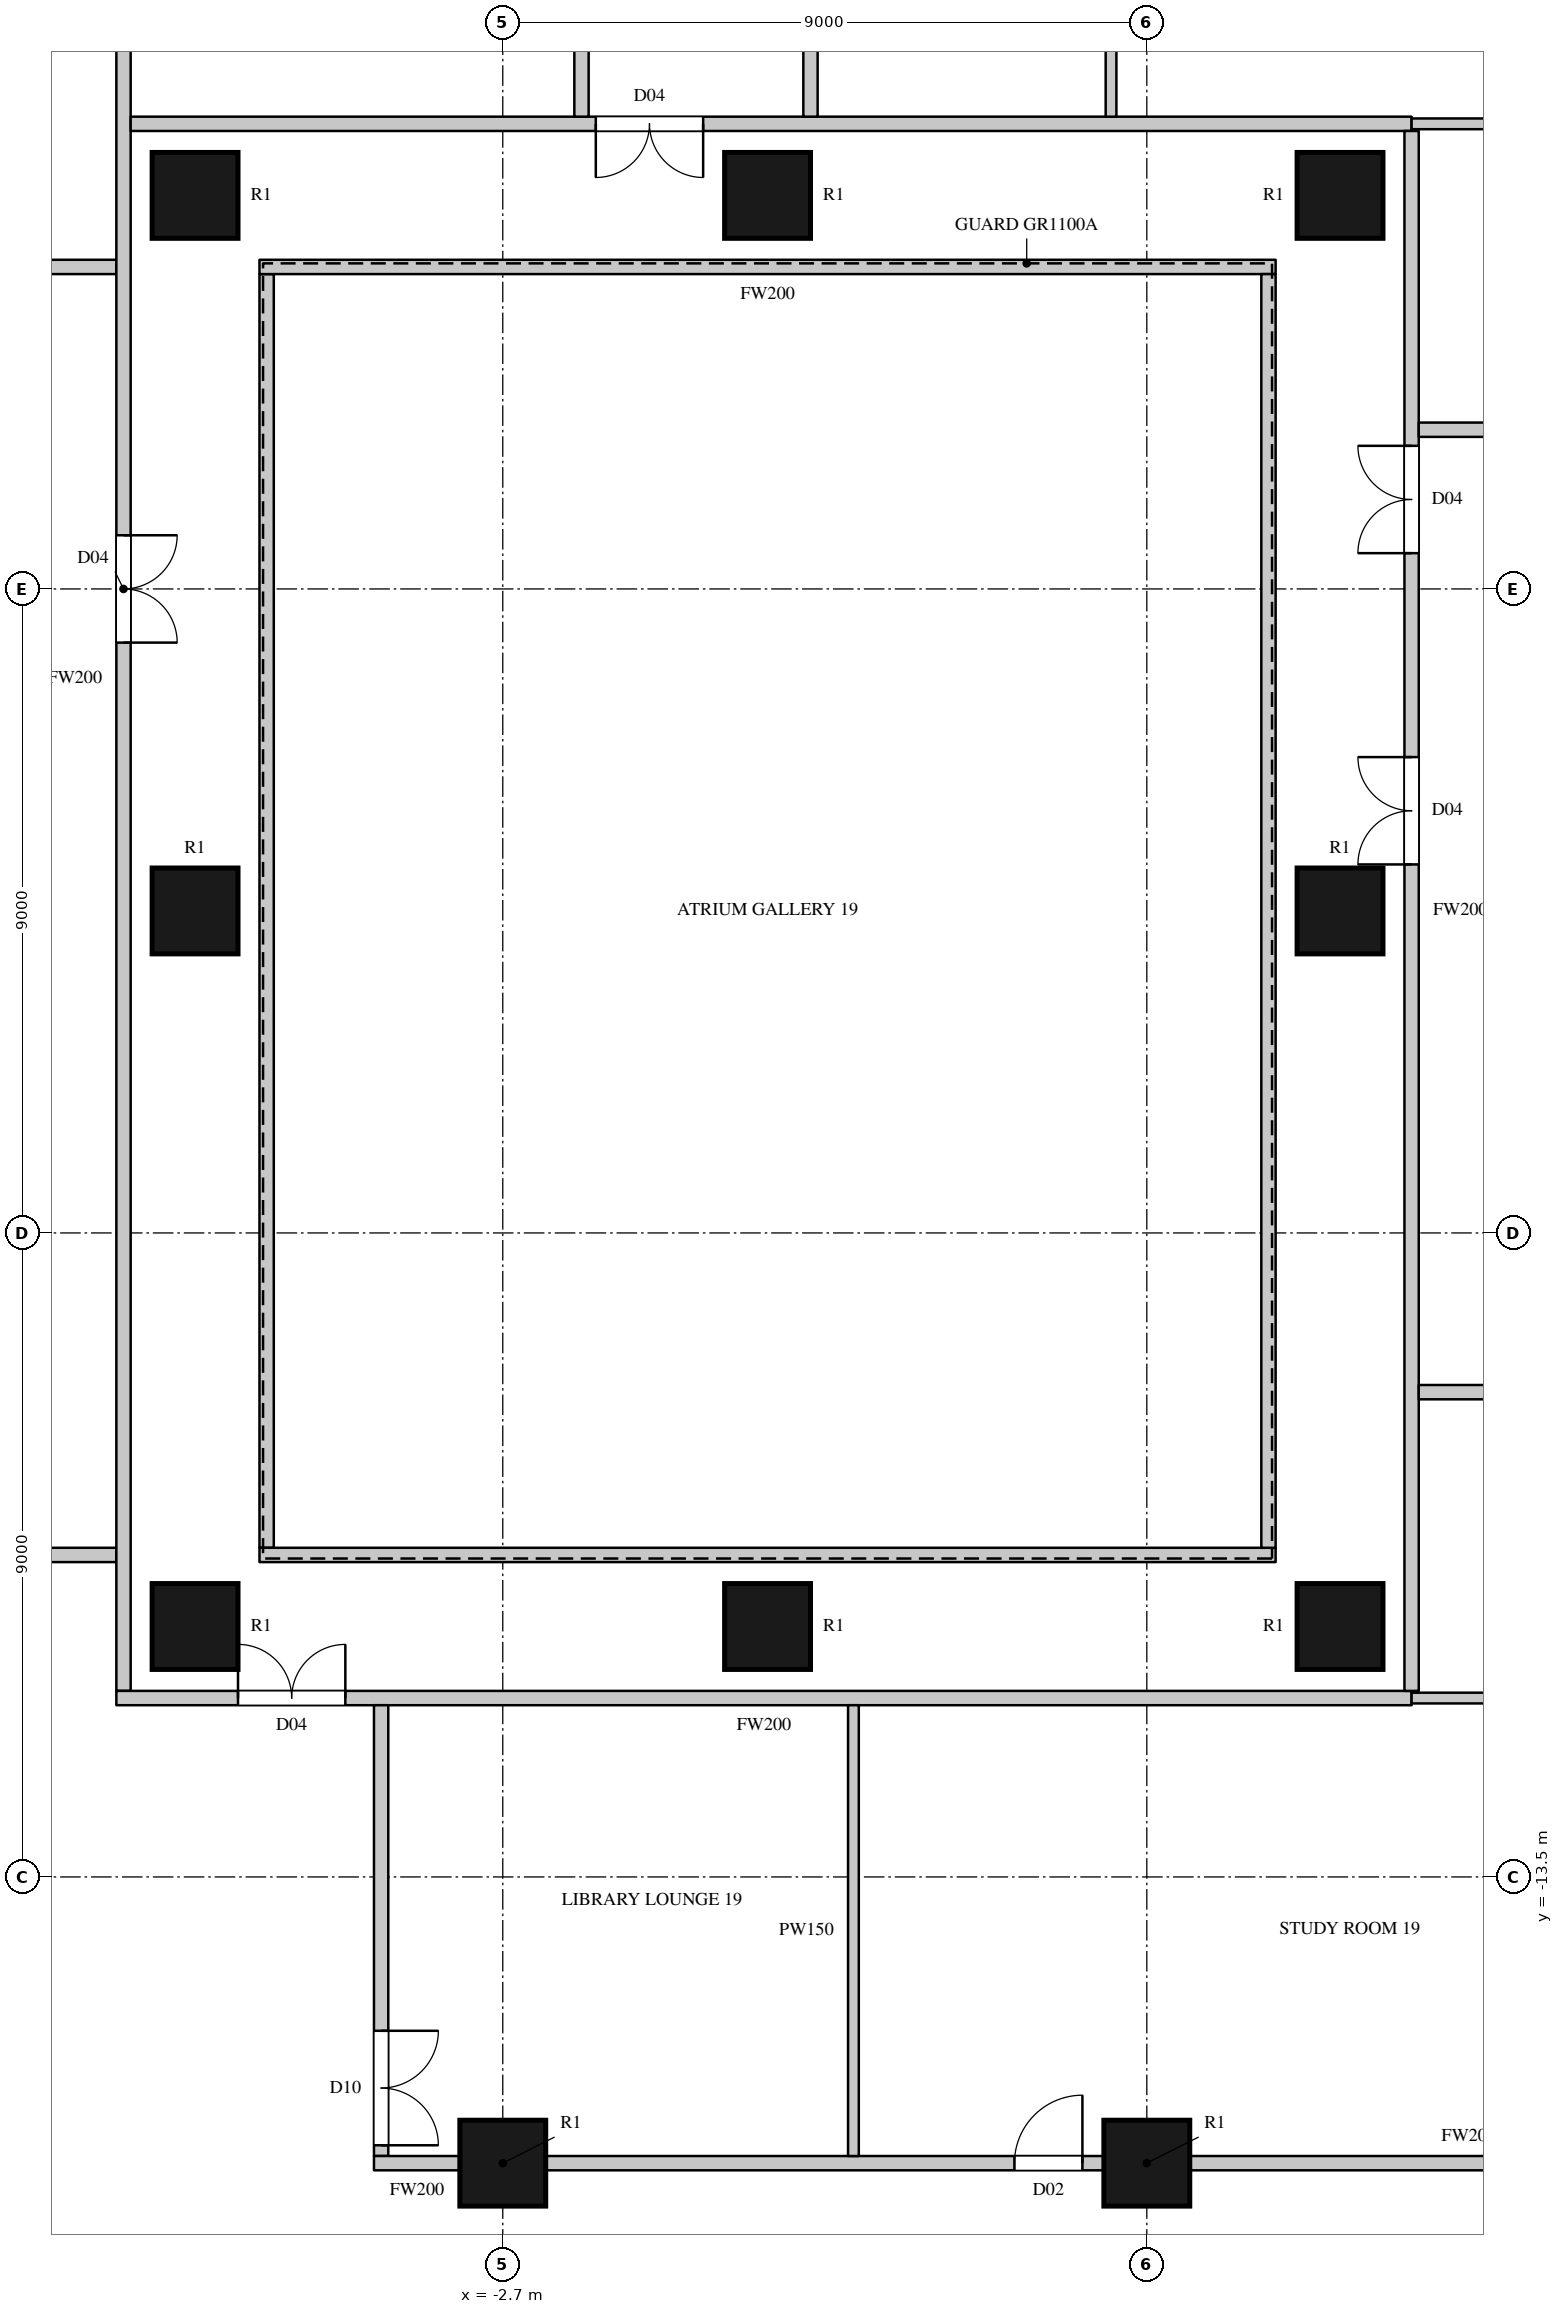
"""IFC4 building model, lengths in metres.
Left out: names, types, materials, properties, quantities, classifications, styles, units other than length and angle.
Written with IfcOpenShell. Run it as: python <this file> out.ifc"""

import sys

from ifc_helpers import new_model, si_unit, direction, frame, frame_2d, origin, origin_2d, place, context, subcontext, project, spatial, rectangle, circle, extrude, element, fill, save


model = new_model("IFC4")
c1 = context("Model", 3, precision=1e-05, world=origin(), true_north=direction((0.0, 1.0)))
c2 = subcontext(c1, "Body", "Model", "MODEL_VIEW")
j1 = project(units=[si_unit("LENGTHUNIT", "METRE"), si_unit("PLANEANGLEUNIT", "RADIAN")], contexts=[c1])
p1 = place(None, origin())
s1 = spatial("IfcSite", under=j1, at=p1, CompositionType="ELEMENT")
p2 = place(p1, origin())
s2 = spatial("IfcBuilding", under=s1, at=p2, CompositionType="ELEMENT")
p3 = place(p2, frame((0.0, 0.0, 98.7)))
s3 = spatial("IfcBuildingStorey", under=s2, at=p3, CompositionType="ELEMENT", Elevation=98.7)
for number, where, z_axis, x_axis in (
    (1, (-2.7, -17.5, 0.0), (0.0, 0.0, 1.0), (1.0, 0.0, 0.0)),
    (2, (6.3, -17.5, 0.0), (0.0, 0.0, 1.0), (1.0, 0.0, 0.0)),
    (3, (-7.0, -10.0, 0.0), (0.0, 0.0, 1.0), (1.0, 0.0, 0.0)),
    (4, (-7.0, 0.0, 0.0), (0.0, 0.0, 1.0), (1.0, 0.0, 0.0)),
    (5, (-7.0, 10.0, 0.0), (0.0, 0.0, 1.0), (1.0, 0.0, 0.0)),
    (6, (1.0, -10.0, 0.0), (0.0, 0.0, 1.0), (1.0, 0.0, 0.0)),
    (7, (1.0, 10.0, 0.0), (0.0, 0.0, 1.0), (1.0, 0.0, 0.0)),
    (8, (9.0, -10.0, 0.0), (0.0, 0.0, 1.0), (1.0, 0.0, 0.0)),
    (9, (9.0, 0.0, 0.0), (0.0, 0.0, 1.0), (1.0, 0.0, 0.0)),
    (10, (9.0, 10.0, 0.0), (0.0, 0.0, 1.0), (1.0, 0.0, 0.0)),
):
    element("IfcColumn", number, at=place(p3, frame(where, z_axis=z_axis, x_axis=x_axis)), inside=s3, PredefinedType="COLUMN", context=c2, shape_type="SweptSolid", body=[
        extrude(circle(Radius=0.6, at=origin_2d()), origin(), (0.0, 0.0, 1.0), 3.6),
    ])
p4 = place(p3, frame((-13.97, -9.0, 0.0), z_axis=(0.0, 0.0, 1.0), x_axis=(1.0, 0.0, 0.0)))
e11 = element("IfcWall", 11, at=p4, inside=s3, PredefinedType="PARTITIONING", context=c2, shape_type="SweptSolid", body=[
    extrude(rectangle(XDim=5.87, YDim=0.2, at=frame_2d((2.935, 0.0))), origin(), (0.0, 0.0, 1.0), 3.3),
])
p5 = place(p4, frame((0.4, 0.0, 0.0)))
e12 = element("IfcOpeningElement", 12, at=p5, cuts=e11, PredefinedType="OPENING", context=c2, shape_type="SweptSolid", body=[
    extrude(rectangle(XDim=1.5, YDim=2.2, at=frame_2d((0.75, 1.1))), frame((0.0, 0.11, 0.0), z_axis=(0.0, -1.0, 0.0), x_axis=(1.0, 0.0, 0.0)), (0.0, 0.0, 1.0), 0.22),
])
p6 = place(p4, frame((2.05, 0.0, 0.0)))
e13 = element("IfcOpeningElement", 13, at=p6, cuts=e11, PredefinedType="OPENING", context=c2, shape_type="SweptSolid", body=[
    extrude(rectangle(XDim=1.5, YDim=2.2, at=frame_2d((0.75, 1.1))), frame((0.0, 0.11, 0.0), z_axis=(0.0, -1.0, 0.0), x_axis=(1.0, 0.0, 0.0)), (0.0, 0.0, 1.0), 0.22),
])
p7 = place(p3, frame((-13.97, 9.0, 0.0), z_axis=(0.0, 0.0, 1.0), x_axis=(1.0, 0.0, 0.0)))
e14 = element("IfcWall", 14, at=p7, inside=s3, PredefinedType="PARTITIONING", context=c2, shape_type="SweptSolid", body=[
    extrude(rectangle(XDim=5.87, YDim=0.2, at=frame_2d((2.935, 0.0))), origin(), (0.0, 0.0, 1.0), 3.3),
])
p8 = place(p3, frame((-8.0, -10.9, 0.0), z_axis=(0.0, 0.0, 1.0), x_axis=(0.0, 1.0, 0.0)))
e15 = element("IfcWall", 15, at=p8, inside=s3, PredefinedType="PARTITIONING", context=c2, shape_type="SweptSolid", body=[
    extrude(rectangle(XDim=28.3, YDim=0.2, at=frame_2d((14.15, 0.0))), origin(), (0.0, 0.0, 1.0), 3.3),
])
p9 = place(p8, frame((14.65, 0.0, 0.0)))
e16 = element("IfcOpeningElement", 16, at=p9, cuts=e15, PredefinedType="OPENING", context=c2, shape_type="SweptSolid", body=[
    extrude(rectangle(XDim=1.5, YDim=2.2, at=frame_2d((0.75, 1.1))), frame((0.0, 0.11, 0.0), z_axis=(0.0, -1.0, 0.0), x_axis=(1.0, 0.0, 0.0)), (0.0, 0.0, 1.0), 0.22),
])
p10 = place(p8, frame((26.55, 0.0, 0.0)))
e17 = element("IfcOpeningElement", 17, at=p10, cuts=e15, PredefinedType="OPENING", context=c2, shape_type="SweptSolid", body=[
    extrude(rectangle(XDim=1.6, YDim=2.4, at=frame_2d((0.8, 1.2))), frame((0.0, 0.11, 0.0), z_axis=(0.0, -1.0, 0.0), x_axis=(1.0, 0.0, 0.0)), (0.0, 0.0, 1.0), 0.22),
])
p11 = place(p3, frame((-8.1, -11.0, 0.0), z_axis=(0.0, 0.0, 1.0), x_axis=(1.0, 0.0, 0.0)))
e18 = element("IfcWall", 18, at=p11, inside=s3, PredefinedType="PARTITIONING", context=c2, shape_type="SweptSolid", body=[
    extrude(rectangle(XDim=18.1, YDim=0.2, at=frame_2d((9.05, 0.0))), origin(), (0.0, 0.0, 1.0), 3.3),
])
p12 = place(p11, frame((1.7, 0.0, 0.0)))
e19 = element("IfcOpeningElement", 19, at=p12, cuts=e18, PredefinedType="OPENING", context=c2, shape_type="SweptSolid", body=[
    extrude(rectangle(XDim=1.5, YDim=2.2, at=frame_2d((0.75, 1.1))), frame((0.0, 0.11, 0.0), z_axis=(0.0, -1.0, 0.0), x_axis=(1.0, 0.0, 0.0)), (0.0, 0.0, 1.0), 0.22),
])
p13 = place(p3, frame((-7.9, 11.0, 0.0), z_axis=(0.0, 0.0, 1.0), x_axis=(1.0, 0.0, 0.0)))
e20 = element("IfcWall", 20, at=p13, inside=s3, PredefinedType="PARTITIONING", context=c2, shape_type="SweptSolid", body=[
    extrude(rectangle(XDim=17.9, YDim=0.2, at=frame_2d((8.95, 0.0))), origin(), (0.0, 0.0, 1.0), 3.3),
])
p14 = place(p13, frame((6.5, 0.0, 0.0)))
e21 = element("IfcOpeningElement", 21, at=p14, cuts=e20, PredefinedType="OPENING", context=c2, shape_type="SweptSolid", body=[
    extrude(rectangle(XDim=1.5, YDim=2.2, at=frame_2d((0.75, 1.1))), frame((0.0, 0.11, 0.0), z_axis=(0.0, -1.0, 0.0), x_axis=(1.0, 0.0, 0.0)), (0.0, 0.0, 1.0), 0.22),
])
p15 = place(p3, frame((-6.0, -8.9, 0.0), z_axis=(0.0, 0.0, 1.0), x_axis=(0.0, 1.0, 0.0)))
e22 = element("IfcWall", 22, at=p15, inside=s3, PredefinedType="PARTITIONING", context=c2, shape_type="SweptSolid", body=[
    extrude(rectangle(XDim=17.8, YDim=0.2, at=frame_2d((8.9, 0.0))), origin(), (0.0, 0.0, 1.0), 3.3),
])
for number, where, z_axis, x_axis in (
    (23, (-6.1, -9.0, 0.0), (0.0, 0.0, 1.0), (1.0, 0.0, 0.0)),
    (24, (-6.1, 9.0, 0.0), (0.0, 0.0, 1.0), (1.0, 0.0, 0.0)),
):
    element("IfcWall", number, at=place(p3, frame(where, z_axis=z_axis, x_axis=x_axis)), inside=s3, PredefinedType="PARTITIONING", context=c2, shape_type="SweptSolid", body=[
        extrude(rectangle(XDim=14.2, YDim=0.2, at=frame_2d((7.1, 0.0))), origin(), (0.0, 0.0, 1.0), 3.3),
    ])
p16 = place(p3, frame((-4.4, -17.4, 0.0), z_axis=(0.0, 0.0, 1.0), x_axis=(0.0, 1.0, 0.0)))
e25 = element("IfcWall", 25, at=p16, inside=s3, PredefinedType="PARTITIONING", context=c2, shape_type="SweptSolid", body=[
    extrude(rectangle(XDim=6.3, YDim=0.2, at=frame_2d((3.15, 0.0))), origin(), (0.0, 0.0, 1.0), 3.3),
])
p17 = place(p16, frame((0.15, 0.0, 0.0)))
e26 = element("IfcOpeningElement", 26, at=p17, cuts=e25, PredefinedType="OPENING", context=c2, shape_type="SweptSolid", body=[
    extrude(rectangle(XDim=1.6, YDim=2.4, at=frame_2d((0.8, 1.2))), frame((0.0, 0.11, 0.0), z_axis=(0.0, -1.0, 0.0), x_axis=(1.0, 0.0, 0.0)), (0.0, 0.0, 1.0), 0.22),
])
p18 = place(p3, frame((-4.5, -17.5, 0.0), z_axis=(0.0, 0.0, 1.0), x_axis=(1.0, 0.0, 0.0)))
e27 = element("IfcWall", 27, at=p18, inside=s3, PredefinedType="PARTITIONING", context=c2, shape_type="SweptSolid", body=[
    extrude(rectangle(XDim=1.2, YDim=0.2, at=frame_2d((0.6, 0.0))), origin(), (0.0, 0.0, 1.0), 2.75),
])
p19 = place(p3, frame((-2.1, -17.5, 0.0), z_axis=(0.0, 0.0, 1.0), x_axis=(1.0, 0.0, 0.0)))
e28 = element("IfcWall", 28, at=p19, inside=s3, PredefinedType="PARTITIONING", context=c2, shape_type="SweptSolid", body=[
    extrude(rectangle(XDim=7.8, YDim=0.2, at=frame_2d((3.9, 0.0))), origin(), (0.0, 0.0, 1.0), 2.75),
])
p20 = place(p19, frame((6.55, 0.0, 0.0)))
e29 = element("IfcOpeningElement", 29, at=p20, cuts=e28, PredefinedType="OPENING", context=c2, shape_type="SweptSolid", body=[
    extrude(rectangle(XDim=0.95, YDim=2.2, at=frame_2d((0.475, 1.1))), frame((0.0, 0.11, 0.0), z_axis=(0.0, -1.0, 0.0), x_axis=(1.0, 0.0, 0.0)), (0.0, 0.0, 1.0), 0.22),
])
p21 = place(p3, frame((6.9, -17.5, 0.0), z_axis=(0.0, 0.0, 1.0), x_axis=(1.0, 0.0, 0.0)))
e30 = element("IfcWall", 30, at=p21, inside=s3, PredefinedType="PARTITIONING", context=c2, shape_type="SweptSolid", body=[
    extrude(rectangle(XDim=7.8, YDim=0.2, at=frame_2d((3.9, 0.0))), origin(), (0.0, 0.0, 1.0), 2.75),
])
p22 = place(p3, frame((-1.6, 11.1, 0.0), z_axis=(0.0, 0.0, 1.0), x_axis=(0.0, 1.0, 0.0)))
e31 = element("IfcWall", 31, at=p22, inside=s3, PredefinedType="PARTITIONING", context=c2, shape_type="SweptSolid", body=[
    extrude(rectangle(XDim=6.3, YDim=0.2, at=frame_2d((3.15, 0.0))), origin(), (0.0, 0.0, 1.0), 3.3),
])
p23 = place(p3, frame((1.6, 11.1, 0.0), z_axis=(0.0, 0.0, 1.0), x_axis=(0.0, 1.0, 0.0)))
e32 = element("IfcWall", 32, at=p23, inside=s3, PredefinedType="PARTITIONING", context=c2, shape_type="SweptSolid", body=[
    extrude(rectangle(XDim=6.3, YDim=0.2, at=frame_2d((3.15, 0.0))), origin(), (0.0, 0.0, 1.0), 3.3),
])
p24 = place(p23, frame((5.25, 0.0, 0.0)))
e33 = element("IfcOpeningElement", 33, at=p24, cuts=e32, PredefinedType="OPENING", context=c2, shape_type="SweptSolid", body=[
    extrude(rectangle(XDim=0.9, YDim=2.2, at=frame_2d((0.45, 1.1))), frame((0.0, 0.11, 0.0), z_axis=(0.0, -1.0, 0.0), x_axis=(1.0, 0.0, 0.0)), (0.0, 0.0, 1.0), 0.22),
])
p25 = place(p3, frame((8.0, -8.9, 0.0), z_axis=(0.0, 0.0, 1.0), x_axis=(0.0, 1.0, 0.0)))
e34 = element("IfcWall", 34, at=p25, inside=s3, PredefinedType="PARTITIONING", context=c2, shape_type="SweptSolid", body=[
    extrude(rectangle(XDim=17.8, YDim=0.2, at=frame_2d((8.9, 0.0))), origin(), (0.0, 0.0, 1.0), 3.3),
])
p26 = place(p3, frame((10.0, -10.9, 0.0), z_axis=(0.0, 0.0, 1.0), x_axis=(0.0, 1.0, 0.0)))
e35 = element("IfcWall", 35, at=p26, inside=s3, PredefinedType="PARTITIONING", context=c2, shape_type="SweptSolid", body=[
    extrude(rectangle(XDim=21.8, YDim=0.2, at=frame_2d((10.9, 0.0))), origin(), (0.0, 0.0, 1.0), 3.3),
])
p27 = place(p26, frame((15.9, 0.0, 0.0)))
e36 = element("IfcOpeningElement", 36, at=p27, cuts=e35, PredefinedType="OPENING", context=c2, shape_type="SweptSolid", body=[
    extrude(rectangle(XDim=1.5, YDim=2.2, at=frame_2d((0.75, 1.1))), frame((0.0, 0.11, 0.0), z_axis=(0.0, -1.0, 0.0), x_axis=(1.0, 0.0, 0.0)), (0.0, 0.0, 1.0), 0.22),
])
p28 = place(p26, frame((11.55, 0.0, 0.0)))
e37 = element("IfcOpeningElement", 37, at=p28, cuts=e35, PredefinedType="OPENING", context=c2, shape_type="SweptSolid", body=[
    extrude(rectangle(XDim=1.5, YDim=2.2, at=frame_2d((0.75, 1.1))), frame((0.0, 0.11, 0.0), z_axis=(0.0, -1.0, 0.0), x_axis=(1.0, 0.0, 0.0)), (0.0, 0.0, 1.0), 0.22),
])
p29 = place(p3, frame((10.1, -6.725, 0.0), z_axis=(0.0, 0.0, 1.0), x_axis=(1.0, 0.0, 0.0)))
e38 = element("IfcWall", 38, at=p29, inside=s3, PredefinedType="PARTITIONING", context=c2, shape_type="SweptSolid", body=[
    extrude(rectangle(XDim=6.1, YDim=0.2, at=frame_2d((3.05, 0.0))), origin(), (0.0, 0.0, 1.0), 3.3),
])
p30 = place(p29, frame((4.85, 0.0, 0.0)))
e39 = element("IfcOpeningElement", 39, at=p30, cuts=e38, PredefinedType="OPENING", context=c2, shape_type="SweptSolid", body=[
    extrude(rectangle(XDim=0.9, YDim=2.2, at=frame_2d((0.45, 1.1))), frame((0.0, 0.11, 0.0), z_axis=(0.0, -1.0, 0.0), x_axis=(1.0, 0.0, 0.0)), (0.0, 0.0, 1.0), 0.22),
])
p31 = place(p3, frame((10.1, 6.725, 0.0), z_axis=(0.0, 0.0, 1.0), x_axis=(1.0, 0.0, 0.0)))
e40 = element("IfcWall", 40, at=p31, inside=s3, PredefinedType="PARTITIONING", context=c2, shape_type="SweptSolid", body=[
    extrude(rectangle(XDim=6.1, YDim=0.2, at=frame_2d((3.05, 0.0))), origin(), (0.0, 0.0, 1.0), 3.3),
])
p32 = place(p31, frame((4.9, 0.0, 0.0)))
e41 = element("IfcOpeningElement", 41, at=p32, cuts=e40, PredefinedType="OPENING", context=c2, shape_type="SweptSolid", body=[
    extrude(rectangle(XDim=0.9, YDim=2.2, at=frame_2d((0.45, 1.1))), frame((0.0, 0.11, 0.0), z_axis=(0.0, -1.0, 0.0), x_axis=(1.0, 0.0, 0.0)), (0.0, 0.0, 1.0), 0.22),
])
p33 = place(p3, frame((2.2, -17.4, 0.0), z_axis=(0.0, 0.0, 1.0), x_axis=(0.0, 1.0, 0.0)))
e42 = element("IfcWall", 42, at=p33, inside=s3, PredefinedType="PARTITIONING", context=c2, shape_type="SweptSolid", body=[
    extrude(rectangle(XDim=6.3, YDim=0.15, at=frame_2d((3.15, 0.0))), origin(), (0.0, 0.0, 1.0), 3.3),
])
p34 = place(p3, frame((5.8, 11.1, 0.0), z_axis=(0.0, 0.0, 1.0), x_axis=(0.0, 1.0, 0.0)))
e43 = element("IfcWall", 43, at=p34, inside=s3, PredefinedType="PARTITIONING", context=c2, shape_type="SweptSolid", body=[
    extrude(rectangle(XDim=5.989, YDim=0.15, at=frame_2d((2.994, 0.0))), origin(), (0.0, 0.0, 1.0), 3.3),
])
for number, where, z_axis, x_axis in (
    (44, (10.0, -11.0, 0.0), (0.0, 0.0, 1.0), (1.0, 0.0, 0.0)),
    (45, (10.0, 11.0, 0.0), (0.0, 0.0, 1.0), (1.0, 0.0, 0.0)),
):
    element("IfcWall", number, at=place(p3, frame(where, z_axis=z_axis, x_axis=x_axis)), inside=s3, PredefinedType="PARTITIONING", context=c2, shape_type="SweptSolid", body=[
        extrude(rectangle(XDim=6.0, YDim=0.15, at=frame_2d((3.0, 0.0))), origin(), (0.0, 0.0, 1.0), 3.3),
    ])
p35 = place(p9, origin())
e46 = element("IfcDoor", 46, at=p35, inside=s3, OperationType="DOUBLE_DOOR_SINGLE_SWING", PredefinedType="DOOR", context=c2, shape_type="SweptSolid", body=[
    extrude(rectangle(XDim=1.5, YDim=2.2, at=frame_2d((0.75, 1.1))), frame((0.0, 0.025, 0.0), z_axis=(0.0, -1.0, 0.0), x_axis=(1.0, 0.0, 0.0)), (0.0, 0.0, 1.0), 0.05),
])
fill(e16, e46)
p36 = place(p12, origin())
e47 = element("IfcDoor", 47, at=p36, inside=s3, OperationType="DOUBLE_DOOR_SINGLE_SWING", PredefinedType="DOOR", context=c2, shape_type="SweptSolid", body=[
    extrude(rectangle(XDim=1.5, YDim=2.2, at=frame_2d((0.75, 1.1))), frame((0.0, 0.025, 0.0), z_axis=(0.0, -1.0, 0.0), x_axis=(1.0, 0.0, 0.0)), (0.0, 0.0, 1.0), 0.05),
])
fill(e19, e47)
p37 = place(p14, origin())
e48 = element("IfcDoor", 48, at=p37, inside=s3, OperationType="DOUBLE_DOOR_SINGLE_SWING", PredefinedType="DOOR", context=c2, shape_type="SweptSolid", body=[
    extrude(rectangle(XDim=1.5, YDim=2.2, at=frame_2d((0.75, 1.1))), frame((0.0, 0.025, 0.0), z_axis=(0.0, -1.0, 0.0), x_axis=(1.0, 0.0, 0.0)), (0.0, 0.0, 1.0), 0.05),
])
fill(e21, e48)
p38 = place(p27, origin())
e49 = element("IfcDoor", 49, at=p38, inside=s3, OperationType="DOUBLE_DOOR_SINGLE_SWING", PredefinedType="DOOR", context=c2, shape_type="SweptSolid", body=[
    extrude(rectangle(XDim=1.5, YDim=2.2, at=frame_2d((0.75, 1.1))), frame((0.0, 0.025, 0.0), z_axis=(0.0, -1.0, 0.0), x_axis=(1.0, 0.0, 0.0)), (0.0, 0.0, 1.0), 0.05),
])
fill(e36, e49)
p39 = place(p28, origin())
e50 = element("IfcDoor", 50, at=p39, inside=s3, OperationType="DOUBLE_DOOR_SINGLE_SWING", PredefinedType="DOOR", context=c2, shape_type="SweptSolid", body=[
    extrude(rectangle(XDim=1.5, YDim=2.2, at=frame_2d((0.75, 1.1))), frame((0.0, 0.025, 0.0), z_axis=(0.0, -1.0, 0.0), x_axis=(1.0, 0.0, 0.0)), (0.0, 0.0, 1.0), 0.05),
])
fill(e37, e50)
p40 = place(p17, origin())
e51 = element("IfcDoor", 51, at=p40, inside=s3, OperationType="DOUBLE_DOOR_SINGLE_SWING", PredefinedType="DOOR", context=c2, shape_type="SweptSolid", body=[
    extrude(rectangle(XDim=1.6, YDim=2.4, at=frame_2d((0.8, 1.2))), frame((0.0, 0.025, 0.0), z_axis=(0.0, -1.0, 0.0), x_axis=(1.0, 0.0, 0.0)), (0.0, 0.0, 1.0), 0.05),
])
fill(e26, e51)
p41 = place(p20, origin())
e52 = element("IfcDoor", 52, at=p41, inside=s3, OperationType="SINGLE_SWING_RIGHT", PredefinedType="DOOR", context=c2, shape_type="SweptSolid", body=[
    extrude(rectangle(XDim=0.95, YDim=2.2, at=frame_2d((0.475, 1.1))), frame((0.0, 0.025, 0.0), z_axis=(0.0, -1.0, 0.0), x_axis=(1.0, 0.0, 0.0)), (0.0, 0.0, 1.0), 0.05),
])
fill(e29, e52)
save(model, sys.argv[1])
